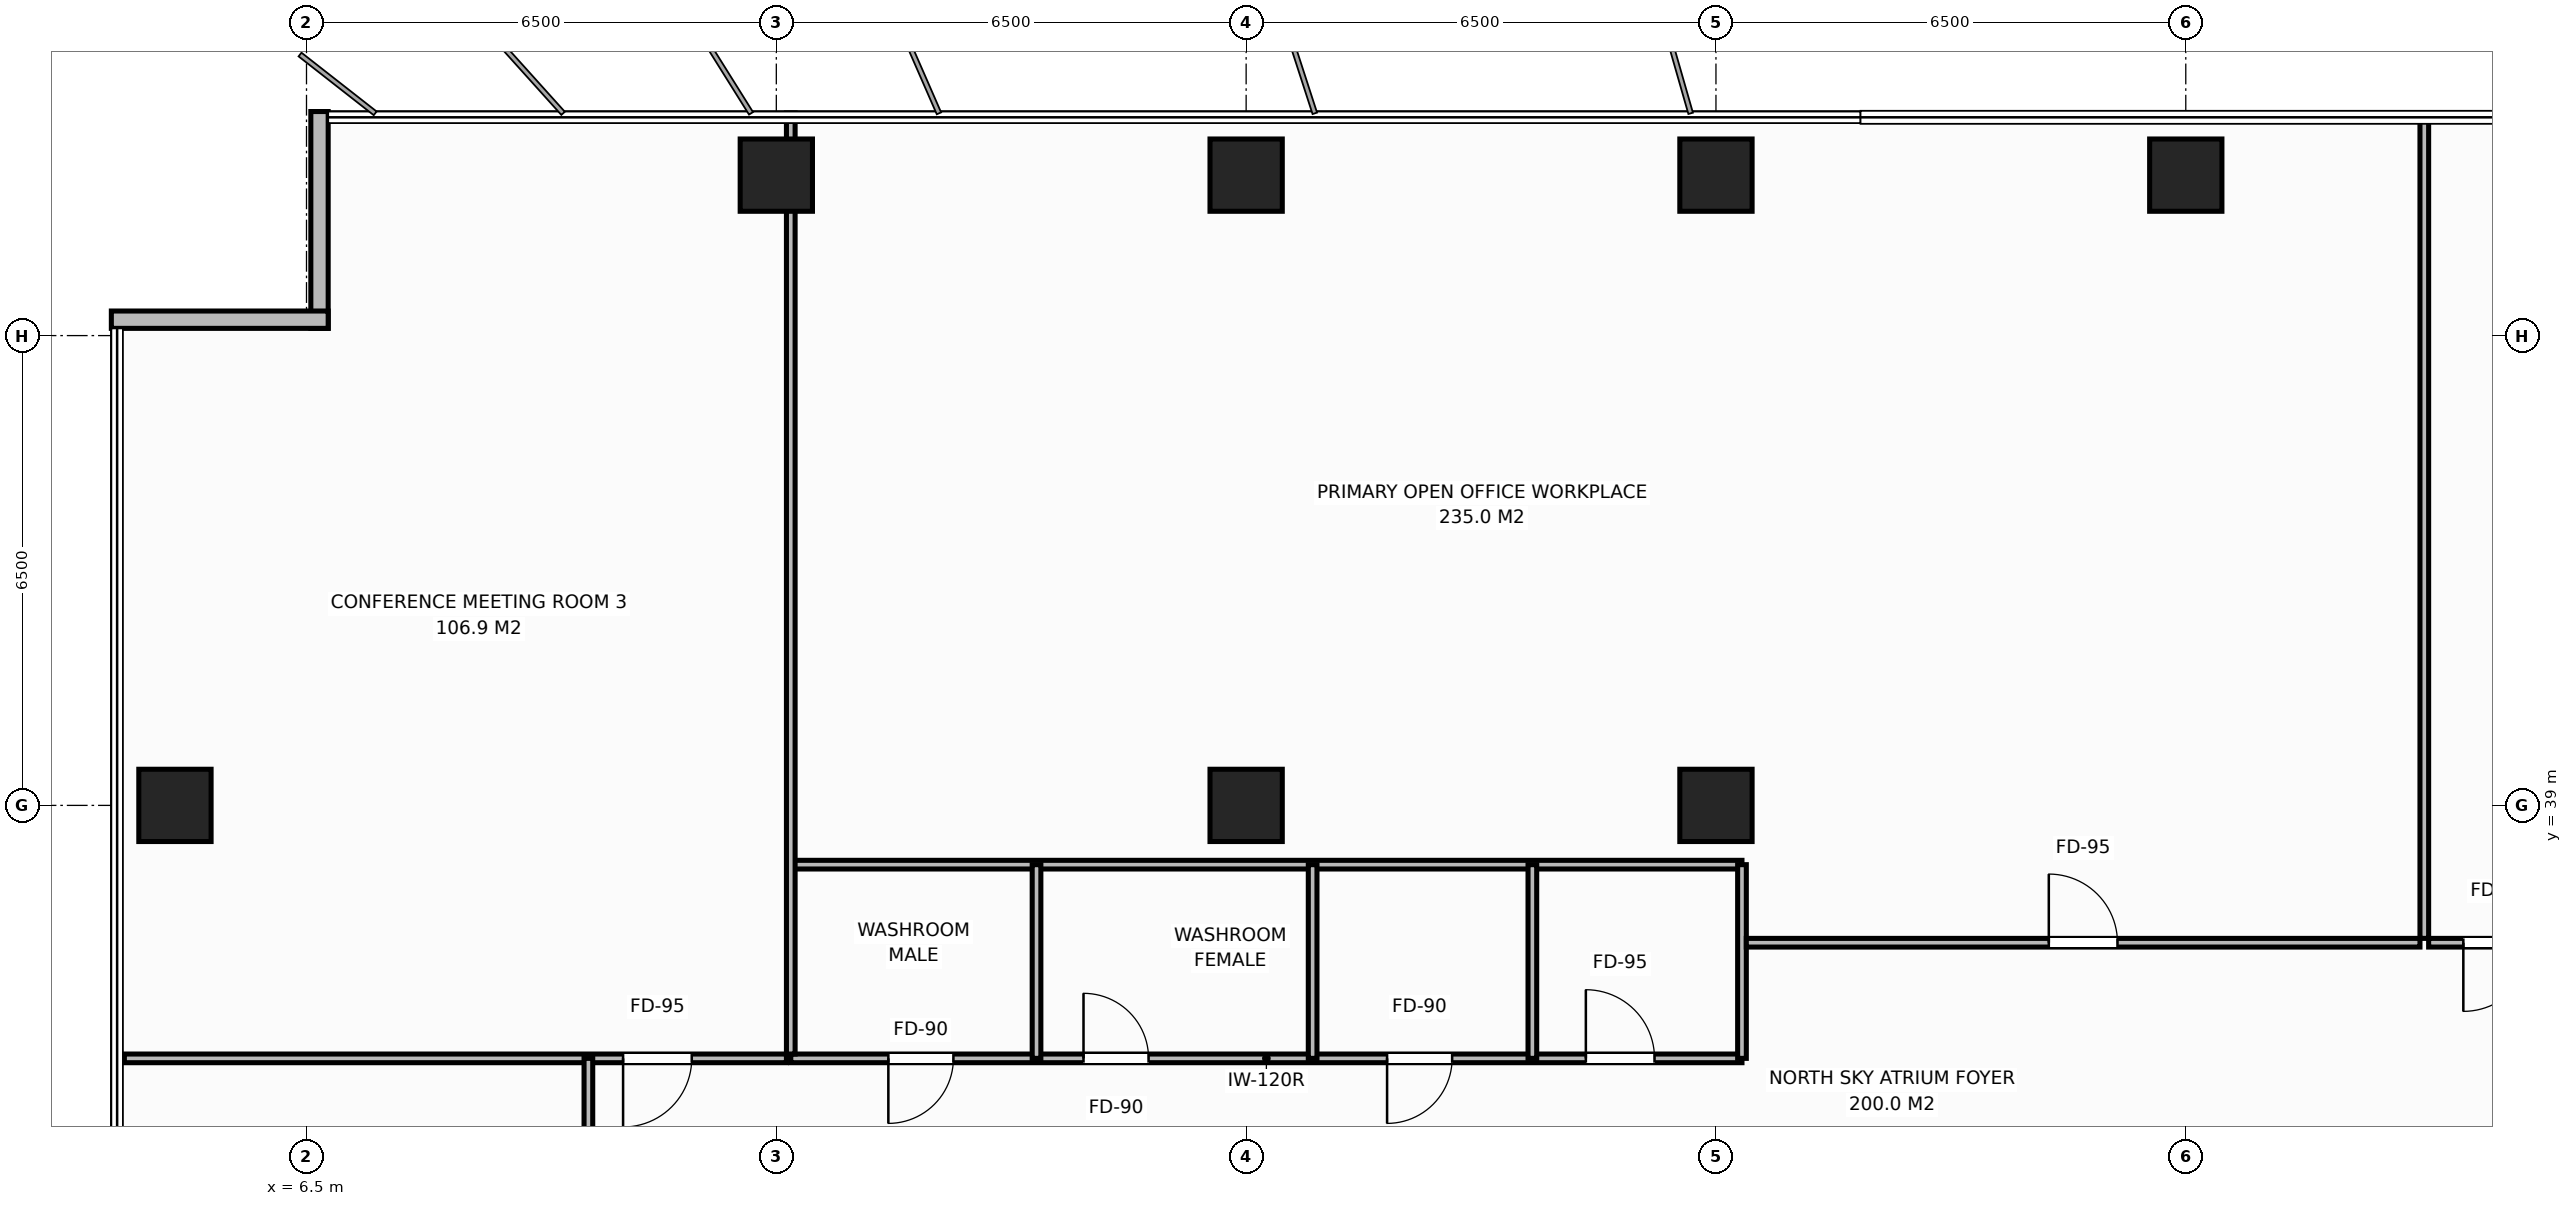
"""IFC4 building model, lengths in metres.
Left out: names, types, materials, properties, quantities, classifications, styles, units other than length and angle.
Written with IfcOpenShell. Run it as: python <this file> out.ifc"""

import sys

from ifc_helpers import new_model, si_unit, direction, frame, frame_2d, origin, origin_2d, place, context, subcontext, project, spatial, rectangle, extrude, element, fill, save


model = new_model("IFC4")
c1 = context("Model", 3, precision=1e-05, world=origin(), true_north=direction((0.0, 1.0)))
c2 = subcontext(c1, "Body", "Model", "MODEL_VIEW")
j1 = project(units=[si_unit("LENGTHUNIT", "METRE"), si_unit("PLANEANGLEUNIT", "RADIAN")], contexts=[c1])
p1 = place(None, origin())
s1 = spatial("IfcSite", under=j1, at=p1, CompositionType="ELEMENT")
p2 = place(p1, origin())
s2 = spatial("IfcBuilding", under=s1, at=p2, CompositionType="ELEMENT")
p3 = place(p2, frame((0.0, 0.0, 189.8)))
s3 = spatial("IfcBuildingStorey", under=s2, at=p3, CompositionType="ELEMENT", Elevation=189.8)
for number, where, z_axis, x_axis in (
    (1, (19.5, 39.0, 0.0), (0.0, 0.0, 1.0), (1.0, 0.0, 0.0)),
    (2, (26.0, 39.0, 0.0), (0.0, 0.0, 1.0), (1.0, 0.0, 0.0)),
    (3, (13.0, 47.72, 0.0), (0.0, 0.0, 1.0), (1.0, 0.0, 0.0)),
    (4, (19.5, 47.72, 0.0), (0.0, 0.0, 1.0), (1.0, 0.0, 0.0)),
    (5, (26.0, 47.72, 0.0), (0.0, 0.0, 1.0), (1.0, 0.0, 0.0)),
    (6, (32.5, 47.72, 0.0), (0.0, 0.0, 1.0), (1.0, 0.0, 0.0)),
    (7, (4.68, 39.0, 0.0), (0.0, 0.0, 1.0), (1.0, 0.0, 0.0)),
):
    element("IfcColumn", number, at=place(p3, frame(where, z_axis=z_axis, x_axis=x_axis)), inside=s3, PredefinedType="COLUMN", context=c2, shape_type="SweptSolid", body=[
        extrude(rectangle(XDim=1.0, YDim=1.0, at=origin_2d()), origin(), (0.0, 0.0, 1.0), 3.8),
    ])
for number, where, z_axis, x_axis in (
    (8, (6.68, 45.6, 0.0), (0.0, 0.0, 1.0), (0.0, 1.0, 0.0)),
    (9, (3.8, 45.72, 0.0), (0.0, 0.0, 1.0), (1.0, 0.0, 0.0)),
):
    element("IfcWall", number, at=place(p3, frame(where, z_axis=z_axis, x_axis=x_axis)), inside=s3, PredefinedType="STANDARD", context=c2, shape_type="SweptSolid", body=[
        extrude(rectangle(XDim=3.0, YDim=0.24, at=frame_2d((1.5, 0.0))), origin(), (0.0, 0.0, 1.0), 3.572),
    ])
p4 = place(p3, frame((13.2, 35.5, 0.0), z_axis=(0.0, 0.0, 1.0), x_axis=(1.0, 0.0, 0.0)))
e10 = element("IfcWall", 10, at=p4, inside=s3, PredefinedType="PARTITIONING", context=c2, shape_type="SweptSolid", body=[
    extrude(rectangle(XDim=13.16, YDim=0.12, at=frame_2d((6.58, 0.0))), origin(), (0.0, 0.0, 1.0), 3.572),
])
p5 = place(p4, frame((1.35, 0.0, 0.0)))
e11 = element("IfcOpeningElement", 11, at=p5, cuts=e10, PredefinedType="OPENING", context=c2, shape_type="SweptSolid", body=[
    extrude(rectangle(XDim=0.9, YDim=2.15, at=frame_2d((0.45, 1.075))), frame((0.0, 0.07, 0.0), z_axis=(0.0, -1.0, 0.0), x_axis=(1.0, 0.0, 0.0)), (0.0, 0.0, 1.0), 0.14),
])
p6 = place(p4, frame((4.05, 0.0, 0.0)))
e12 = element("IfcOpeningElement", 12, at=p6, cuts=e10, PredefinedType="OPENING", context=c2, shape_type="SweptSolid", body=[
    extrude(rectangle(XDim=0.9, YDim=2.15, at=frame_2d((0.45, 1.075))), frame((0.0, 0.07, 0.0), z_axis=(0.0, -1.0, 0.0), x_axis=(1.0, 0.0, 0.0)), (0.0, 0.0, 1.0), 0.14),
])
p7 = place(p4, frame((8.25, 0.0, 0.0)))
e13 = element("IfcOpeningElement", 13, at=p7, cuts=e10, PredefinedType="OPENING", context=c2, shape_type="SweptSolid", body=[
    extrude(rectangle(XDim=0.9, YDim=2.15, at=frame_2d((0.45, 1.075))), frame((0.0, 0.07, 0.0), z_axis=(0.0, -1.0, 0.0), x_axis=(1.0, 0.0, 0.0)), (0.0, 0.0, 1.0), 0.14),
])
p8 = place(p4, frame((11.0, 0.0, 0.0)))
e14 = element("IfcOpeningElement", 14, at=p8, cuts=e10, PredefinedType="OPENING", context=c2, shape_type="SweptSolid", body=[
    extrude(rectangle(XDim=0.95, YDim=2.15, at=frame_2d((0.475, 1.075))), frame((0.0, 0.07, 0.0), z_axis=(0.0, -1.0, 0.0), x_axis=(1.0, 0.0, 0.0)), (0.0, 0.0, 1.0), 0.14),
])
p9 = place(p3, frame((13.2, 38.18, 0.0), z_axis=(0.0, 0.0, 1.0), x_axis=(1.0, 0.0, 0.0)))
e15 = element("IfcWall", 15, at=p9, inside=s3, PredefinedType="PARTITIONING", context=c2, shape_type="SweptSolid", body=[
    extrude(rectangle(XDim=13.16, YDim=0.12, at=frame_2d((6.58, 0.0))), origin(), (0.0, 0.0, 1.0), 3.572),
])
for number, where, z_axis, x_axis in (
    (16, (16.6, 35.5, 0.0), (0.0, 0.0, 1.0), (0.0, 1.0, 0.0)),
    (17, (20.42, 35.5, 0.0), (0.0, 0.0, 1.0), (0.0, 1.0, 0.0)),
    (18, (23.46, 35.5, 0.0), (0.0, 0.0, 1.0), (0.0, 1.0, 0.0)),
    (19, (26.36, 35.5, 0.0), (0.0, 0.0, 1.0), (0.0, 1.0, 0.0)),
):
    element("IfcWall", number, at=place(p3, frame(where, z_axis=z_axis, x_axis=x_axis)), inside=s3, PredefinedType="PARTITIONING", context=c2, shape_type="SweptSolid", body=[
        extrude(rectangle(XDim=2.68, YDim=0.12, at=frame_2d((1.34, 0.0))), origin(), (0.0, 0.0, 1.0), 3.572),
    ])
p10 = place(p3, frame((13.2, 35.56, 0.0), z_axis=(0.0, 0.0, 1.0), x_axis=(0.0, 1.0, 0.0)))
e20 = element("IfcWall", 20, at=p10, inside=s3, PredefinedType="PARTITIONING", context=c2, shape_type="SweptSolid", body=[
    extrude(rectangle(XDim=13.02, YDim=0.12, at=frame_2d((6.51, 0.0))), origin(), (0.0, 0.0, 1.0), 3.022),
])
p11 = place(p3, frame((3.98, 35.5, 0.0), z_axis=(0.0, 0.0, 1.0), x_axis=(1.0, 0.0, 0.0)))
e21 = element("IfcWall", 21, at=p11, inside=s3, PredefinedType="PARTITIONING", context=c2, shape_type="SweptSolid", body=[
    extrude(rectangle(XDim=9.16, YDim=0.12, at=frame_2d((4.58, 0.0))), origin(), (0.0, 0.0, 1.0), 3.572),
])
p12 = place(p11, frame((6.9, 0.0, 0.0)))
e22 = element("IfcOpeningElement", 22, at=p12, cuts=e21, PredefinedType="OPENING", context=c2, shape_type="SweptSolid", body=[
    extrude(rectangle(XDim=0.95, YDim=2.15, at=frame_2d((0.475, 1.075))), frame((0.0, 0.07, 0.0), z_axis=(0.0, -1.0, 0.0), x_axis=(1.0, 0.0, 0.0)), (0.0, 0.0, 1.0), 0.14),
])
p13 = place(p3, frame((35.8, 37.16, 0.0), z_axis=(0.0, 0.0, 1.0), x_axis=(0.0, 1.0, 0.0)))
e23 = element("IfcWall", 23, at=p13, inside=s3, PredefinedType="PARTITIONING", context=c2, shape_type="SweptSolid", body=[
    extrude(rectangle(XDim=11.42, YDim=0.12, at=frame_2d((5.71, 0.0))), origin(), (0.0, 0.0, 1.0), 3.572),
])
p14 = place(p3, frame((26.42, 37.1, 0.0), z_axis=(0.0, 0.0, 1.0), x_axis=(1.0, 0.0, 0.0)))
e24 = element("IfcWall", 24, at=p14, inside=s3, PredefinedType="PARTITIONING", context=c2, shape_type="SweptSolid", body=[
    extrude(rectangle(XDim=9.32, YDim=0.12, at=frame_2d((4.66, 0.0))), origin(), (0.0, 0.0, 1.0), 3.572),
])
p15 = place(p14, frame((4.185, 0.0, 0.0)))
e25 = element("IfcOpeningElement", 25, at=p15, cuts=e24, PredefinedType="OPENING", context=c2, shape_type="SweptSolid", body=[
    extrude(rectangle(XDim=0.95, YDim=2.15, at=frame_2d((0.475, 1.075))), frame((0.0, 0.07, 0.0), z_axis=(0.0, -1.0, 0.0), x_axis=(1.0, 0.0, 0.0)), (0.0, 0.0, 1.0), 0.14),
])
p16 = place(p3, frame((35.86, 37.1, 0.0), z_axis=(0.0, 0.0, 1.0), x_axis=(1.0, 0.0, 0.0)))
e26 = element("IfcWall", 26, at=p16, inside=s3, PredefinedType="PARTITIONING", context=c2, shape_type="SweptSolid", body=[
    extrude(rectangle(XDim=4.886, YDim=0.12, at=frame_2d((2.443, 0.0))), origin(), (0.0, 0.0, 1.0), 3.572),
])
p17 = place(p16, frame((0.48, 0.0, 0.0)))
e27 = element("IfcOpeningElement", 27, at=p17, cuts=e26, PredefinedType="OPENING", context=c2, shape_type="SweptSolid", body=[
    extrude(rectangle(XDim=0.95, YDim=2.15, at=frame_2d((0.475, 1.075))), frame((0.0, 0.07, 0.0), z_axis=(0.0, -1.0, 0.0), x_axis=(1.0, 0.0, 0.0)), (0.0, 0.0, 1.0), 0.14),
])
p18 = place(p3, frame((10.4, 29.167, 0.0), z_axis=(0.0, 0.0, 1.0), x_axis=(0.0, 1.0, 0.0)))
e28 = element("IfcWall", 28, at=p18, inside=s3, PredefinedType="PARTITIONING", context=c2, shape_type="SweptSolid", body=[
    extrude(rectangle(XDim=6.333, YDim=0.12, at=frame_2d((3.167, 0.0))), origin(), (0.0, 0.0, 1.0), 3.572),
])
p19 = place(p18, frame((1.642, 0.0, 0.0)))
e29 = element("IfcOpeningElement", 29, at=p19, cuts=e28, PredefinedType="OPENING", context=c2, shape_type="SweptSolid", body=[
    extrude(rectangle(XDim=0.95, YDim=2.15, at=frame_2d((0.475, 1.075))), frame((0.0, 0.07, 0.0), z_axis=(0.0, -1.0, 0.0), x_axis=(1.0, 0.0, 0.0)), (0.0, 0.0, 1.0), 0.14),
])
p20 = place(p5, origin())
e30 = element("IfcDoor", 30, at=p20, inside=s3, OperationType="SINGLE_SWING_RIGHT", PredefinedType="DOOR", context=c2, shape_type="SweptSolid", body=[
    extrude(rectangle(XDim=0.9, YDim=2.15, at=frame_2d((0.45, 1.075))), frame((0.0, 0.025, 0.0), z_axis=(0.0, -1.0, 0.0), x_axis=(1.0, 0.0, 0.0)), (0.0, 0.0, 1.0), 0.05),
])
fill(e11, e30)
p21 = place(p6, origin())
e31 = element("IfcDoor", 31, at=p21, inside=s3, OperationType="SINGLE_SWING_LEFT", PredefinedType="DOOR", context=c2, shape_type="SweptSolid", body=[
    extrude(rectangle(XDim=0.9, YDim=2.15, at=frame_2d((0.45, 1.075))), frame((0.0, 0.025, 0.0), z_axis=(0.0, -1.0, 0.0), x_axis=(1.0, 0.0, 0.0)), (0.0, 0.0, 1.0), 0.05),
])
fill(e12, e31)
p22 = place(p7, origin())
e32 = element("IfcDoor", 32, at=p22, inside=s3, OperationType="SINGLE_SWING_RIGHT", PredefinedType="DOOR", context=c2, shape_type="SweptSolid", body=[
    extrude(rectangle(XDim=0.9, YDim=2.15, at=frame_2d((0.45, 1.075))), frame((0.0, 0.025, 0.0), z_axis=(0.0, -1.0, 0.0), x_axis=(1.0, 0.0, 0.0)), (0.0, 0.0, 1.0), 0.05),
])
fill(e13, e32)
p23 = place(p8, origin())
e33 = element("IfcDoor", 33, at=p23, inside=s3, OperationType="SINGLE_SWING_LEFT", PredefinedType="DOOR", context=c2, shape_type="SweptSolid", body=[
    extrude(rectangle(XDim=0.95, YDim=2.15, at=frame_2d((0.475, 1.075))), frame((0.0, 0.025, 0.0), z_axis=(0.0, -1.0, 0.0), x_axis=(1.0, 0.0, 0.0)), (0.0, 0.0, 1.0), 0.05),
])
fill(e14, e33)
p24 = place(p12, origin())
e34 = element("IfcDoor", 34, at=p24, inside=s3, OperationType="SINGLE_SWING_RIGHT", PredefinedType="DOOR", context=c2, shape_type="SweptSolid", body=[
    extrude(rectangle(XDim=0.95, YDim=2.15, at=frame_2d((0.475, 1.075))), frame((0.0, 0.025, 0.0), z_axis=(0.0, -1.0, 0.0), x_axis=(1.0, 0.0, 0.0)), (0.0, 0.0, 1.0), 0.05),
])
fill(e22, e34)
p25 = place(p15, origin())
e35 = element("IfcDoor", 35, at=p25, inside=s3, OperationType="SINGLE_SWING_LEFT", PredefinedType="DOOR", context=c2, shape_type="SweptSolid", body=[
    extrude(rectangle(XDim=0.95, YDim=2.15, at=frame_2d((0.475, 1.075))), frame((0.0, 0.025, 0.0), z_axis=(0.0, -1.0, 0.0), x_axis=(1.0, 0.0, 0.0)), (0.0, 0.0, 1.0), 0.05),
])
fill(e25, e35)
p26 = place(p17, origin())
e36 = element("IfcDoor", 36, at=p26, inside=s3, OperationType="SINGLE_SWING_RIGHT", PredefinedType="DOOR", context=c2, shape_type="SweptSolid", body=[
    extrude(rectangle(XDim=0.95, YDim=2.15, at=frame_2d((0.475, 1.075))), frame((0.0, 0.025, 0.0), z_axis=(0.0, -1.0, 0.0), x_axis=(1.0, 0.0, 0.0)), (0.0, 0.0, 1.0), 0.05),
])
fill(e27, e36)
save(model, sys.argv[1])
